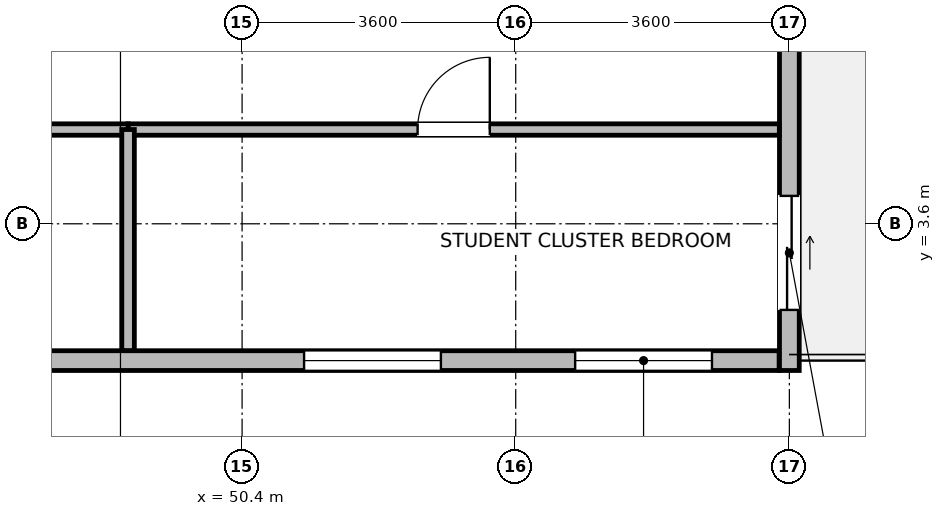
"""IFC4 building model, lengths in metres.
Left out: names, types, materials, properties, quantities, classifications, styles, units other than length and angle.
Written with IfcOpenShell. Run it as: python <this file> out.ifc"""

import sys

from ifc_helpers import new_model, si_unit, direction, frame, frame_2d, origin, place, context, subcontext, project, spatial, rectangle, extrude, element, fill, save


model = new_model("IFC4")
c1 = context("Model", 3, precision=1e-05, world=origin(), true_north=direction((0.0, 1.0)))
c2 = subcontext(c1, "Body", "Model", "MODEL_VIEW")
j1 = project(units=[si_unit("LENGTHUNIT", "METRE"), si_unit("PLANEANGLEUNIT", "RADIAN")], contexts=[c1])
p1 = place(None, origin())
s1 = spatial("IfcSite", under=j1, at=p1, CompositionType="ELEMENT")
p2 = place(p1, origin())
s2 = spatial("IfcBuilding", under=s1, at=p2, CompositionType="ELEMENT")
p3 = place(p2, frame((0.0, 0.0, 29.0)))
s3 = spatial("IfcBuildingStorey", under=s2, at=p3, CompositionType="ELEMENT", Elevation=29.0)
p4 = place(p3, frame((57.465, 1.8, 0.0), z_axis=(0.0, 0.0, 1.0), x_axis=(-1.0, 0.0, 0.0)))
e1 = element("IfcWall", 1, at=p4, inside=s3, PredefinedType="STANDARD", context=c2, shape_type="SweptSolid", body=[
    extrude(rectangle(XDim=28.53, YDim=0.26, at=frame_2d((14.265, 0.0))), origin(), (0.0, 0.0, 1.0), 3.43),
])
p5 = place(p4, frame((0.883, 0.0, 0.85)))
e2 = element("IfcOpeningElement", 2, at=p5, cuts=e1, PredefinedType="OPENING", context=c2, shape_type="SweptSolid", body=[
    extrude(rectangle(XDim=1.8, YDim=1.85, at=frame_2d((0.9, 0.925))), frame((0.0, 0.14, 0.0), z_axis=(0.0, -1.0, 0.0), x_axis=(1.0, 0.0, 0.0)), (0.0, 0.0, 1.0), 0.28),
])
p6 = place(p4, frame((4.449, 0.0, 0.85)))
e3 = element("IfcOpeningElement", 3, at=p6, cuts=e1, PredefinedType="OPENING", context=c2, shape_type="SweptSolid", body=[
    extrude(rectangle(XDim=1.8, YDim=1.85, at=frame_2d((0.9, 0.925))), frame((0.0, 0.14, 0.0), z_axis=(0.0, -1.0, 0.0), x_axis=(1.0, 0.0, 0.0)), (0.0, 0.0, 1.0), 0.28),
])
p7 = place(p4, frame((11.582, 0.0, 0.85)))
e4 = element("IfcOpeningElement", 4, at=p7, cuts=e1, PredefinedType="OPENING", context=c2, shape_type="SweptSolid", body=[
    extrude(rectangle(XDim=1.8, YDim=1.85, at=frame_2d((0.9, 0.925))), frame((0.0, 0.14, 0.0), z_axis=(0.0, -1.0, 0.0), x_axis=(1.0, 0.0, 0.0)), (0.0, 0.0, 1.0), 0.28),
])
p8 = place(p4, frame((18.714, 0.0, 0.85)))
e5 = element("IfcOpeningElement", 5, at=p8, cuts=e1, PredefinedType="OPENING", context=c2, shape_type="SweptSolid", body=[
    extrude(rectangle(XDim=1.8, YDim=1.85, at=frame_2d((0.9, 0.925))), frame((0.0, 0.14, 0.0), z_axis=(0.0, -1.0, 0.0), x_axis=(1.0, 0.0, 0.0)), (0.0, 0.0, 1.0), 0.28),
])
p9 = place(p4, frame((22.281, 0.0, 0.85)))
e6 = element("IfcOpeningElement", 6, at=p9, cuts=e1, PredefinedType="OPENING", context=c2, shape_type="SweptSolid", body=[
    extrude(rectangle(XDim=1.8, YDim=1.85, at=frame_2d((0.9, 0.925))), frame((0.0, 0.14, 0.0), z_axis=(0.0, -1.0, 0.0), x_axis=(1.0, 0.0, 0.0)), (0.0, 0.0, 1.0), 0.28),
])
p10 = place(p4, frame((25.847, 0.0, 0.85)))
e7 = element("IfcOpeningElement", 7, at=p10, cuts=e1, PredefinedType="OPENING", context=c2, shape_type="SweptSolid", body=[
    extrude(rectangle(XDim=1.8, YDim=1.85, at=frame_2d((0.9, 0.925))), frame((0.0, 0.14, 0.0), z_axis=(0.0, -1.0, 0.0), x_axis=(1.0, 0.0, 0.0)), (0.0, 0.0, 1.0), 0.28),
])
p11 = place(p3, frame((57.6, 6.826, 0.0), z_axis=(0.0, 0.0, 1.0), x_axis=(0.0, -1.0, 0.0)))
e8 = element("IfcWall", 8, at=p11, inside=s3, PredefinedType="STANDARD", context=c2, shape_type="SweptSolid", body=[
    extrude(rectangle(XDim=5.156, YDim=0.26, at=frame_2d((2.578, 0.0))), origin(), (0.0, 0.0, 1.0), 3.43),
])
p12 = place(p11, frame((2.859, 0.0, 0.0)))
e9 = element("IfcOpeningElement", 9, at=p12, cuts=e8, PredefinedType="OPENING", context=c2, shape_type="SweptSolid", body=[
    extrude(rectangle(XDim=1.5, YDim=2.15, at=frame_2d((0.75, 1.075))), frame((0.0, 0.14, 0.0), z_axis=(0.0, -1.0, 0.0), x_axis=(1.0, 0.0, 0.0)), (0.0, 0.0, 1.0), 0.28),
])
p13 = place(p3, frame((48.9, 4.84, 0.0), z_axis=(0.0, 0.0, 1.0), x_axis=(1.0, 0.0, 0.0)))
e10 = element("IfcWall", 10, at=p13, inside=s3, PredefinedType="PARTITIONING", context=c2, shape_type="SweptSolid", body=[
    extrude(rectangle(XDim=8.568, YDim=0.15, at=frame_2d((4.284, 0.0))), origin(), (0.0, 0.0, 1.0), 3.43),
])
p14 = place(p13, frame((3.809, 0.0, 0.0)))
e11 = element("IfcOpeningElement", 11, at=p14, cuts=e10, PredefinedType="OPENING", context=c2, shape_type="SweptSolid", body=[
    extrude(rectangle(XDim=0.95, YDim=2.1, at=frame_2d((0.475, 1.05))), frame((0.0, 0.085, 0.0), z_axis=(0.0, -1.0, 0.0), x_axis=(1.0, 0.0, 0.0)), (0.0, 0.0, 1.0), 0.17),
])
p15 = place(p3, frame((40.78, 4.84, 0.0), z_axis=(0.0, 0.0, 1.0), x_axis=(1.0, 0.0, 0.0)))
e12 = element("IfcWall", 12, at=p15, inside=s3, PredefinedType="PARTITIONING", context=c2, shape_type="SweptSolid", body=[
    extrude(rectangle(XDim=8.12, YDim=0.15, at=frame_2d((4.06, 0.0))), origin(), (0.0, 0.0, 1.0), 3.43),
])
p16 = place(p15, frame((3.585, 0.0, 0.0)))
e13 = element("IfcOpeningElement", 13, at=p16, cuts=e12, PredefinedType="OPENING", context=c2, shape_type="SweptSolid", body=[
    extrude(rectangle(XDim=0.95, YDim=2.1, at=frame_2d((0.475, 1.05))), frame((0.0, 0.085, 0.0), z_axis=(0.0, -1.0, 0.0), x_axis=(1.0, 0.0, 0.0)), (0.0, 0.0, 1.0), 0.17),
])
p17 = place(p3, frame((48.9, 1.932, 0.0), z_axis=(0.0, 0.0, 1.0), x_axis=(0.0, 1.0, 0.0)))
e14 = element("IfcWall", 14, at=p17, inside=s3, PredefinedType="PARTITIONING", context=c2, shape_type="SweptSolid", body=[
    extrude(rectangle(XDim=2.908, YDim=0.165, at=frame_2d((1.454, 0.0))), origin(), (0.0, 0.0, 1.0), 3.43),
])
p18 = place(p5, origin())
e15 = element("IfcWindow", 15, at=p18, inside=s3, PartitioningType="SINGLE_PANEL", PredefinedType="WINDOW", context=c2, shape_type="SweptSolid", body=[
    extrude(rectangle(XDim=1.8, YDim=1.85, at=frame_2d((0.9, 0.925))), frame((0.0, 0.03, 0.0), z_axis=(0.0, -1.0, 0.0), x_axis=(1.0, 0.0, 0.0)), (0.0, 0.0, 1.0), 0.06),
])
fill(e2, e15)
p19 = place(p6, origin())
e16 = element("IfcWindow", 16, at=p19, inside=s3, PartitioningType="SINGLE_PANEL", PredefinedType="WINDOW", context=c2, shape_type="SweptSolid", body=[
    extrude(rectangle(XDim=1.8, YDim=1.85, at=frame_2d((0.9, 0.925))), frame((0.0, 0.03, 0.0), z_axis=(0.0, -1.0, 0.0), x_axis=(1.0, 0.0, 0.0)), (0.0, 0.0, 1.0), 0.06),
])
fill(e3, e16)
p20 = place(p12, origin())
e17 = element("IfcDoor", 17, at=p20, inside=s3, OperationType="SLIDING_TO_LEFT", PredefinedType="DOOR", context=c2, shape_type="SweptSolid", body=[
    extrude(rectangle(XDim=1.5, YDim=2.15, at=frame_2d((0.75, 1.075))), frame((0.0, 0.025, 0.0), z_axis=(0.0, -1.0, 0.0), x_axis=(1.0, 0.0, 0.0)), (0.0, 0.0, 1.0), 0.05),
])
fill(e9, e17)
p21 = place(p14, origin())
e18 = element("IfcDoor", 18, at=p21, inside=s3, OperationType="SINGLE_SWING_RIGHT", PredefinedType="DOOR", context=c2, shape_type="SweptSolid", body=[
    extrude(rectangle(XDim=0.95, YDim=2.1, at=frame_2d((0.475, 1.05))), frame((0.0, 0.025, 0.0), z_axis=(0.0, -1.0, 0.0), x_axis=(1.0, 0.0, 0.0)), (0.0, 0.0, 1.0), 0.05),
])
fill(e11, e18)
save(model, sys.argv[1])
